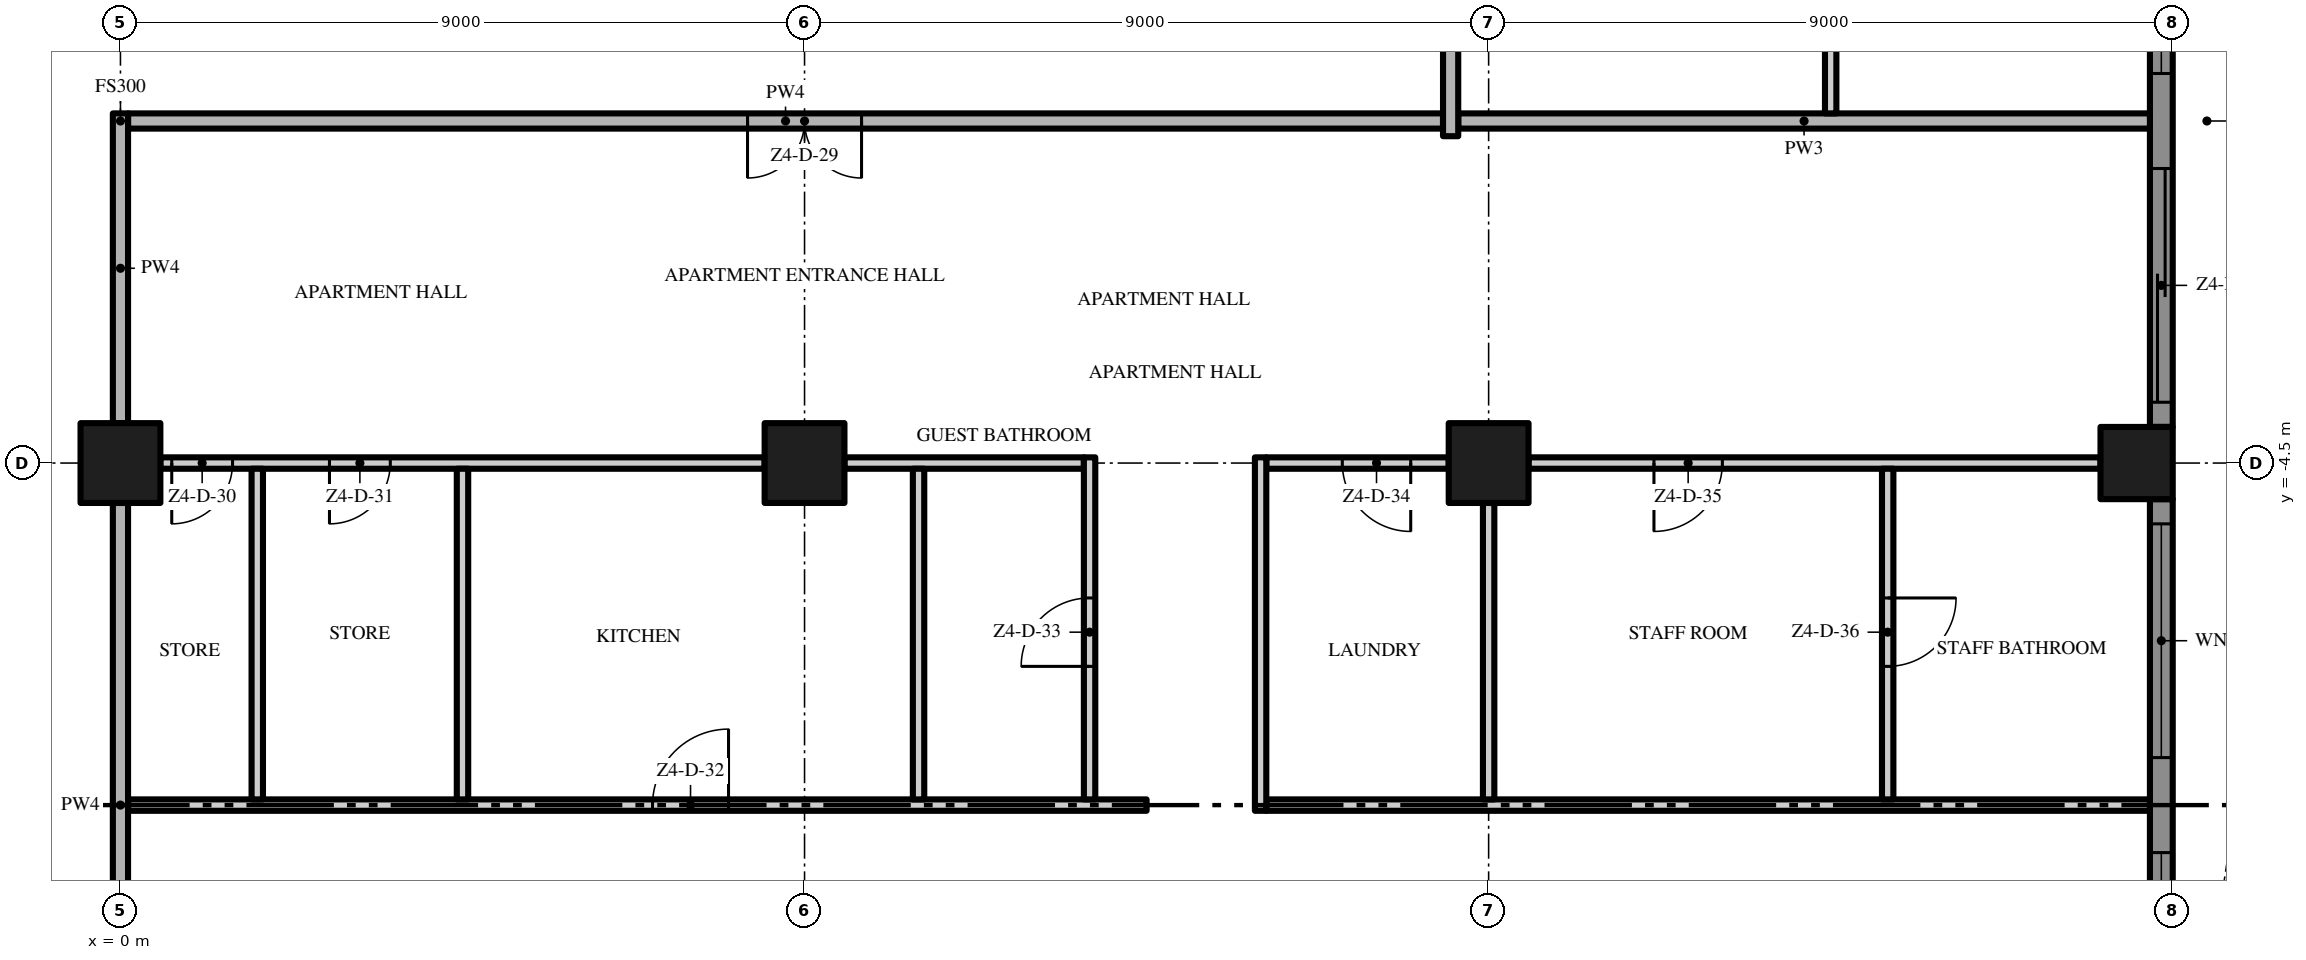
"""IFC4 building model, lengths in metres.
Left out: names, types, materials, properties, quantities, classifications, styles, units other than length and angle.
Written with IfcOpenShell. Run it as: python <this file> out.ifc"""

import sys

from ifc_helpers import new_model, si_unit, direction, frame, frame_2d, origin, origin_2d, place, context, subcontext, project, spatial, polyline, rectangle, outline, extrude, element, fill, save


model = new_model("IFC4")
c1 = context("Model", 3, precision=1e-05, world=origin(), true_north=direction((0.0, 1.0)))
c2 = subcontext(c1, "Body", "Model", "MODEL_VIEW")
j1 = project(units=[si_unit("LENGTHUNIT", "METRE"), si_unit("PLANEANGLEUNIT", "RADIAN")], contexts=[c1])
p1 = place(None, origin())
s1 = spatial("IfcSite", under=j1, at=p1, CompositionType="ELEMENT")
p2 = place(p1, origin())
s2 = spatial("IfcBuilding", under=s1, at=p2, CompositionType="ELEMENT")
p3 = place(p2, frame((0.0, 0.0, 218.6)))
s3 = spatial("IfcBuildingStorey", under=s2, at=p3, CompositionType="ELEMENT", Elevation=218.6)
for number, where, z_axis, x_axis in (
    (1, (0.0, -4.5, 0.0), (0.0, 0.0, 1.0), (1.0, 0.0, 0.0)),
    (2, (18.0, -4.5, 0.0), (0.0, 0.0, 1.0), (1.0, 0.0, 0.0)),
):
    element("IfcColumn", number, at=place(p3, frame(where, z_axis=z_axis, x_axis=x_axis)), inside=s3, PredefinedType="COLUMN", context=c2, shape_type="SweptSolid", body=[
        extrude(rectangle(XDim=1.05, YDim=1.05, at=origin_2d()), origin(), (0.0, 0.0, 1.0), 3.5),
    ])
p4 = place(p3, frame((26.525, -4.5, 0.0), z_axis=(0.0, 0.0, 1.0), x_axis=(1.0, 0.0, 0.0)))
e3 = element("IfcColumn", 3, at=p4, inside=s3, PredefinedType="COLUMN", context=c2, shape_type="SweptSolid", body=[
    extrude(rectangle(XDim=0.95, YDim=0.95, at=origin_2d()), origin(), (0.0, 0.0, 1.0), 3.5),
])
p5 = place(p3, frame((9.0, -4.5, 0.0), z_axis=(0.0, 0.0, 1.0), x_axis=(1.0, 0.0, 0.0)))
e4 = element("IfcColumn", 4, at=p5, inside=s3, PredefinedType="COLUMN", context=c2, shape_type="SweptSolid", body=[
    extrude(rectangle(XDim=1.05, YDim=1.05, at=origin_2d()), origin(), (0.0, 0.0, 1.0), 3.5),
])
p6 = place(p3, frame((26.85, -4.975, 0.0), z_axis=(0.0, 0.0, 1.0), x_axis=(0.0, -1.0, 0.0)))
e5 = element("IfcWall", 5, at=p6, inside=s3, PredefinedType="SOLIDWALL", context=c2, shape_type="SweptSolid", body=[
    extrude(rectangle(XDim=8.05, YDim=0.3, at=frame_2d((4.025, 0.0))), origin(), (0.0, 0.0, 1.0), 3.5),
])
p7 = place(p6, frame((4.65, 0.0, 0.45)))
e6 = element("IfcOpeningElement", 6, at=p7, cuts=e5, PredefinedType="OPENING", context=c2, shape_type="SweptSolid", body=[
    extrude(rectangle(XDim=3.075, YDim=2.65, at=frame_2d((1.538, 1.325))), frame((0.0, 0.16, 0.0), z_axis=(0.0, -1.0, 0.0), x_axis=(1.0, 0.0, 0.0)), (0.0, 0.0, 1.0), 0.32),
])
p8 = place(p6, frame((0.325, 0.0, 0.45)))
e7 = element("IfcOpeningElement", 7, at=p8, cuts=e5, PredefinedType="OPENING", context=c2, shape_type="SweptSolid", body=[
    extrude(rectangle(XDim=3.075, YDim=2.65, at=frame_2d((1.538, 1.325))), frame((0.0, 0.16, 0.0), z_axis=(0.0, -1.0, 0.0), x_axis=(1.0, 0.0, 0.0)), (0.0, 0.0, 1.0), 0.32),
])
p9 = place(p3, frame((26.85, 4.025, 0.0), z_axis=(0.0, 0.0, 1.0), x_axis=(0.0, -1.0, 0.0)))
e8 = element("IfcWall", 8, at=p9, inside=s3, PredefinedType="SOLIDWALL", context=c2, shape_type="SweptSolid", body=[
    extrude(rectangle(XDim=8.05, YDim=0.3, at=frame_2d((4.025, 0.0))), origin(), (0.0, 0.0, 1.0), 3.5),
])
p10 = place(p9, frame((4.65, 0.0, 0.0)))
e9 = element("IfcOpeningElement", 9, at=p10, cuts=e8, PredefinedType="OPENING", context=c2, shape_type="SweptSolid", body=[
    extrude(rectangle(XDim=3.075, YDim=2.4, at=frame_2d((1.538, 1.2))), frame((0.0, 0.16, 0.0), z_axis=(0.0, -1.0, 0.0), x_axis=(1.0, 0.0, 0.0)), (0.0, 0.0, 1.0), 0.32),
])
p11 = place(p9, frame((0.325, 0.0, 0.45)))
e10 = element("IfcOpeningElement", 10, at=p11, cuts=e8, PredefinedType="OPENING", context=c2, shape_type="SweptSolid", body=[
    extrude(rectangle(XDim=3.075, YDim=2.65, at=frame_2d((1.538, 1.325))), frame((0.0, 0.16, 0.0), z_axis=(0.0, -1.0, 0.0), x_axis=(1.0, 0.0, 0.0)), (0.0, 0.0, 1.0), 0.32),
])
p12 = place(p3, origin())
e11 = element("IfcWall", 11, at=p12, inside=s3, PredefinedType="USERDEFINED", context=c2, shape_type="SweptSolid", body=[
    extrude(outline(polyline([(30.0, -18.0), (29.771, -16.5), (29.171, -15.0), (28.429, -13.5), (27.829, -12.0), (27.6, -10.5), (27.829, -9.0), (28.429, -7.5), (29.171, -6.0), (29.771, -4.5), (30.0, -3.0), (29.771, -1.5), (29.171, 0.0), (28.429, 1.5), (27.829, 3.0), (27.6, 4.5), (27.829, 6.0), (28.429, 7.5), (29.171, 9.0), (29.771, 10.5), (30.0, 12.0), (29.771, 13.5), (29.171, 15.0), (28.429, 16.5), (27.829, 18.0), (27.597, 17.907), (28.201, 16.398), (28.942, 14.898), (29.528, 13.434), (29.747, 12.0), (29.528, 10.566), (28.942, 9.102), (28.201, 7.602), (27.586, 6.066), (27.347, 4.5), (27.586, 2.934), (28.201, 1.398), (28.942, -0.102), (29.528, -1.566), (29.747, -3.0), (29.528, -4.434), (28.942, -5.898), (28.201, -7.398), (27.586, -8.934), (27.347, -10.5), (27.586, -12.066), (28.201, -13.602), (28.942, -15.102), (29.528, -16.566), (29.753, -18.038), (30.0, -18.0)])), origin(), (0.0, 0.0, 1.0), 0.9),
])
p13 = place(p3, frame((0.1, -9.0, 0.0), z_axis=(0.0, 0.0, 1.0), x_axis=(1.0, 0.0, 0.0)))
e12 = element("IfcWall", 12, at=p13, inside=s3, PredefinedType="PARTITIONING", context=c2, shape_type="SweptSolid", body=[
    extrude(rectangle(XDim=13.4, YDim=0.15, at=frame_2d((6.7, 0.0))), origin(), (0.0, 0.0, 1.0), 3.5),
])
p14 = place(p13, frame((6.9, 0.0, 0.0)))
e13 = element("IfcOpeningElement", 13, at=p14, cuts=e12, PredefinedType="OPENING", context=c2, shape_type="SweptSolid", body=[
    extrude(rectangle(XDim=1.0, YDim=2.4, at=frame_2d((0.5, 1.2))), frame((0.0, 0.085, 0.0), z_axis=(0.0, -1.0, 0.0), x_axis=(1.0, 0.0, 0.0)), (0.0, 0.0, 1.0), 0.17),
])
p15 = place(p3, frame((15.075, -9.0, 0.0), z_axis=(0.0, 0.0, 1.0), x_axis=(1.0, 0.0, 0.0)))
e14 = element("IfcWall", 14, at=p15, inside=s3, PredefinedType="PARTITIONING", context=c2, shape_type="SweptSolid", body=[
    extrude(rectangle(XDim=11.625, YDim=0.15, at=frame_2d((5.812, 0.0))), origin(), (0.0, 0.0, 1.0), 3.5),
])
p16 = place(p3, frame((8.475, -4.5, 0.0), z_axis=(0.0, 0.0, 1.0), x_axis=(-1.0, 0.0, 0.0)))
e15 = element("IfcWall", 15, at=p16, inside=s3, PredefinedType="PARTITIONING", context=c2, shape_type="SweptSolid", body=[
    extrude(rectangle(XDim=7.95, YDim=0.15, at=frame_2d((3.975, 0.0))), origin(), (0.0, 0.0, 1.0), 3.5),
])
p17 = place(p16, frame((7.0, 0.0, 0.0)))
e16 = element("IfcOpeningElement", 16, at=p17, cuts=e15, PredefinedType="OPENING", context=c2, shape_type="SweptSolid", body=[
    extrude(rectangle(XDim=0.8, YDim=2.0, at=frame_2d((0.4, 1.0))), frame((0.0, 0.085, 0.0), z_axis=(0.0, -1.0, 0.0), x_axis=(1.0, 0.0, 0.0)), (0.0, 0.0, 1.0), 0.17),
])
p18 = place(p16, frame((4.925, 0.0, 0.0)))
e17 = element("IfcOpeningElement", 17, at=p18, cuts=e15, PredefinedType="OPENING", context=c2, shape_type="SweptSolid", body=[
    extrude(rectangle(XDim=0.8, YDim=2.0, at=frame_2d((0.4, 1.0))), frame((0.0, 0.085, 0.0), z_axis=(0.0, -1.0, 0.0), x_axis=(1.0, 0.0, 0.0)), (0.0, 0.0, 1.0), 0.17),
])
p19 = place(p3, frame((9.525, -4.5, 0.0), z_axis=(0.0, 0.0, 1.0), x_axis=(1.0, 0.0, 0.0)))
e18 = element("IfcWall", 18, at=p19, inside=s3, PredefinedType="PARTITIONING", context=c2, shape_type="SweptSolid", body=[
    extrude(rectangle(XDim=3.15, YDim=0.15, at=frame_2d((1.575, 0.0))), origin(), (0.0, 0.0, 1.0), 3.5),
])
p20 = place(p3, frame((17.475, -4.5, 0.0), z_axis=(0.0, 0.0, 1.0), x_axis=(-1.0, 0.0, 0.0)))
e19 = element("IfcWall", 19, at=p20, inside=s3, PredefinedType="PARTITIONING", context=c2, shape_type="SweptSolid", body=[
    extrude(rectangle(XDim=2.4, YDim=0.15, at=frame_2d((1.2, 0.0))), origin(), (0.0, 0.0, 1.0), 3.5),
])
p21 = place(p20, frame((0.5, 0.0, 0.0)))
e20 = element("IfcOpeningElement", 20, at=p21, cuts=e19, PredefinedType="OPENING", context=c2, shape_type="SweptSolid", body=[
    extrude(rectangle(XDim=0.9, YDim=2.1, at=frame_2d((0.45, 1.05))), frame((0.0, 0.085, 0.0), z_axis=(0.0, -1.0, 0.0), x_axis=(1.0, 0.0, 0.0)), (0.0, 0.0, 1.0), 0.17),
])
p22 = place(p3, frame((26.05, -4.5, 0.0), z_axis=(0.0, 0.0, 1.0), x_axis=(-1.0, 0.0, 0.0)))
e21 = element("IfcWall", 21, at=p22, inside=s3, PredefinedType="PARTITIONING", context=c2, shape_type="SweptSolid", body=[
    extrude(rectangle(XDim=7.525, YDim=0.15, at=frame_2d((3.763, 0.0))), origin(), (0.0, 0.0, 1.0), 3.5),
])
p23 = place(p22, frame((4.975, 0.0, 0.0)))
e22 = element("IfcOpeningElement", 22, at=p23, cuts=e21, PredefinedType="OPENING", context=c2, shape_type="SweptSolid", body=[
    extrude(rectangle(XDim=0.9, YDim=2.1, at=frame_2d((0.45, 1.05))), frame((0.0, 0.085, 0.0), z_axis=(0.0, -1.0, 0.0), x_axis=(1.0, 0.0, 0.0)), (0.0, 0.0, 1.0), 0.17),
])
p24 = place(p3, frame((17.4, 0.0, 0.0), z_axis=(0.0, 0.0, 1.0), x_axis=(-1.0, 0.0, 0.0)))
e23 = element("IfcWall", 23, at=p24, inside=s3, PredefinedType="PARTITIONING", context=c2, shape_type="SweptSolid", body=[
    extrude(rectangle(XDim=17.3, YDim=0.2, at=frame_2d((8.65, 0.0))), origin(), (0.0, 0.0, 1.0), 3.5),
])
p25 = place(p24, frame((7.65, 0.0, 0.0)))
e24 = element("IfcOpeningElement", 24, at=p25, cuts=e23, PredefinedType="OPENING", context=c2, shape_type="SweptSolid", body=[
    extrude(rectangle(XDim=1.5, YDim=2.4, at=frame_2d((0.75, 1.2))), frame((0.0, 0.11, 0.0), z_axis=(0.0, -1.0, 0.0), x_axis=(1.0, 0.0, 0.0)), (0.0, 0.0, 1.0), 0.22),
])
p26 = place(p3, frame((17.6, 0.0, 0.0), z_axis=(0.0, 0.0, 1.0), x_axis=(1.0, 0.0, 0.0)))
e25 = element("IfcWall", 25, at=p26, inside=s3, PredefinedType="PARTITIONING", context=c2, shape_type="SweptSolid", body=[
    extrude(rectangle(XDim=9.1, YDim=0.2, at=frame_2d((4.55, 0.0))), origin(), (0.0, 0.0, 1.0), 3.5),
])
p27 = place(p3, frame((0.0, -12.975, 0.0), z_axis=(0.0, 0.0, 1.0), x_axis=(0.0, 1.0, 0.0)))
e26 = element("IfcWall", 26, at=p27, inside=s3, PredefinedType="PARTITIONING", context=c2, shape_type="SweptSolid", body=[
    extrude(rectangle(XDim=7.95, YDim=0.2, at=frame_2d((3.975, 0.0))), origin(), (0.0, 0.0, 1.0), 3.5),
])
p28 = place(p3, frame((0.0, -3.975, 0.0), z_axis=(0.0, 0.0, 1.0), x_axis=(0.0, 1.0, 0.0)))
e27 = element("IfcWall", 27, at=p28, inside=s3, PredefinedType="PARTITIONING", context=c2, shape_type="SweptSolid", body=[
    extrude(rectangle(XDim=4.075, YDim=0.2, at=frame_2d((2.038, 0.0))), origin(), (0.0, 0.0, 1.0), 3.5),
])
for number, where, z_axis, x_axis in (
    (28, (1.8, -8.925, 0.0), (0.0, 0.0, 1.0), (0.0, 1.0, 0.0)),
    (29, (4.5, -8.925, 0.0), (0.0, 0.0, 1.0), (0.0, 1.0, 0.0)),
    (30, (10.5, -8.925, 0.0), (0.0, 0.0, 1.0), (0.0, 1.0, 0.0)),
):
    element("IfcWall", number, at=place(p3, frame(where, z_axis=z_axis, x_axis=x_axis)), inside=s3, PredefinedType="PARTITIONING", context=c2, shape_type="SweptSolid", body=[
        extrude(rectangle(XDim=4.35, YDim=0.15, at=frame_2d((2.175, 0.0))), origin(), (0.0, 0.0, 1.0), 3.5),
    ])
p29 = place(p3, frame((12.75, -8.925, 0.0), z_axis=(0.0, 0.0, 1.0), x_axis=(0.0, 1.0, 0.0)))
e31 = element("IfcWall", 31, at=p29, inside=s3, PredefinedType="PARTITIONING", context=c2, shape_type="SweptSolid", body=[
    extrude(rectangle(XDim=4.5, YDim=0.15, at=frame_2d((2.25, 0.0))), origin(), (0.0, 0.0, 1.0), 3.5),
])
p30 = place(p29, frame((1.75, 0.0, 0.0)))
e32 = element("IfcOpeningElement", 32, at=p30, cuts=e31, PredefinedType="OPENING", context=c2, shape_type="SweptSolid", body=[
    extrude(rectangle(XDim=0.9, YDim=2.1, at=frame_2d((0.45, 1.05))), frame((0.0, 0.085, 0.0), z_axis=(0.0, -1.0, 0.0), x_axis=(1.0, 0.0, 0.0)), (0.0, 0.0, 1.0), 0.17),
])
p31 = place(p3, frame((15.0, -9.075, 0.0), z_axis=(0.0, 0.0, 1.0), x_axis=(0.0, 1.0, 0.0)))
e33 = element("IfcWall", 33, at=p31, inside=s3, PredefinedType="PARTITIONING", context=c2, shape_type="SweptSolid", body=[
    extrude(rectangle(XDim=4.65, YDim=0.15, at=frame_2d((2.325, 0.0))), origin(), (0.0, 0.0, 1.0), 3.5),
])
p32 = place(p3, frame((17.5, -0.2, 0.0), z_axis=(0.0, 0.0, 1.0), x_axis=(0.0, 1.0, 0.0)))
e34 = element("IfcWall", 34, at=p32, inside=s3, PredefinedType="PARTITIONING", context=c2, shape_type="SweptSolid", body=[
    extrude(rectangle(XDim=4.175, YDim=0.2, at=frame_2d((2.087, 0.0))), origin(), (0.0, 0.0, 1.0), 3.5),
])
p33 = place(p3, frame((18.0, -8.925, 0.0), z_axis=(0.0, 0.0, 1.0), x_axis=(0.0, 1.0, 0.0)))
e35 = element("IfcWall", 35, at=p33, inside=s3, PredefinedType="PARTITIONING", context=c2, shape_type="SweptSolid", body=[
    extrude(rectangle(XDim=3.9, YDim=0.15, at=frame_2d((1.95, 0.0))), origin(), (0.0, 0.0, 1.0), 3.5),
])
p34 = place(p3, frame((22.5, 17.525, 0.0), z_axis=(0.0, 0.0, 1.0), x_axis=(0.0, -1.0, 0.0)))
e36 = element("IfcWall", 36, at=p34, inside=s3, PredefinedType="PARTITIONING", context=c2, shape_type="SweptSolid", body=[
    extrude(rectangle(XDim=17.425, YDim=0.15, at=frame_2d((8.713, 0.0))), origin(), (0.0, 0.0, 1.0), 3.5),
])
p35 = place(p34, frame((14.775, 0.0, 0.0)))
e37 = element("IfcOpeningElement", 37, at=p35, cuts=e36, PredefinedType="OPENING", context=c2, shape_type="SweptSolid", body=[
    extrude(rectangle(XDim=1.0, YDim=2.4, at=frame_2d((0.5, 1.2))), frame((0.0, 0.085, 0.0), z_axis=(0.0, -1.0, 0.0), x_axis=(1.0, 0.0, 0.0)), (0.0, 0.0, 1.0), 0.17),
])
p36 = place(p34, frame((11.425, 0.0, 0.0)))
e38 = element("IfcOpeningElement", 38, at=p36, cuts=e36, PredefinedType="OPENING", context=c2, shape_type="SweptSolid", body=[
    extrude(rectangle(XDim=1.0, YDim=2.4, at=frame_2d((0.5, 1.2))), frame((0.0, 0.085, 0.0), z_axis=(0.0, -1.0, 0.0), x_axis=(1.0, 0.0, 0.0)), (0.0, 0.0, 1.0), 0.17),
])
p37 = place(p34, frame((2.375, 0.0, 0.0)))
e39 = element("IfcOpeningElement", 39, at=p37, cuts=e36, PredefinedType="OPENING", context=c2, shape_type="SweptSolid", body=[
    extrude(rectangle(XDim=1.8, YDim=2.4, at=frame_2d((0.9, 1.2))), frame((0.0, 0.085, 0.0), z_axis=(0.0, -1.0, 0.0), x_axis=(1.0, 0.0, 0.0)), (0.0, 0.0, 1.0), 0.17),
])
p38 = place(p3, frame((23.25, -4.575, 0.0), z_axis=(0.0, 0.0, 1.0), x_axis=(0.0, -1.0, 0.0)))
e40 = element("IfcWall", 40, at=p38, inside=s3, PredefinedType="PARTITIONING", context=c2, shape_type="SweptSolid", body=[
    extrude(rectangle(XDim=4.35, YDim=0.15, at=frame_2d((2.175, 0.0))), origin(), (0.0, 0.0, 1.0), 3.5),
])
p39 = place(p38, frame((1.7, 0.0, 0.0)))
e41 = element("IfcOpeningElement", 41, at=p39, cuts=e40, PredefinedType="OPENING", context=c2, shape_type="SweptSolid", body=[
    extrude(rectangle(XDim=0.9, YDim=2.1, at=frame_2d((0.45, 1.05))), frame((0.0, 0.085, 0.0), z_axis=(0.0, -1.0, 0.0), x_axis=(1.0, 0.0, 0.0)), (0.0, 0.0, 1.0), 0.17),
])
p40 = place(p7, origin())
e42 = element("IfcWindow", 42, at=p40, inside=s3, PartitioningType="SINGLE_PANEL", PredefinedType="WINDOW", context=c2, shape_type="SweptSolid", body=[
    extrude(rectangle(XDim=3.075, YDim=2.65, at=frame_2d((1.538, 1.325))), frame((0.0, 0.03, 0.0), z_axis=(0.0, -1.0, 0.0), x_axis=(1.0, 0.0, 0.0)), (0.0, 0.0, 1.0), 0.06),
])
fill(e6, e42)
p41 = place(p8, origin())
e43 = element("IfcWindow", 43, at=p41, inside=s3, PartitioningType="SINGLE_PANEL", PredefinedType="WINDOW", context=c2, shape_type="SweptSolid", body=[
    extrude(rectangle(XDim=3.075, YDim=2.65, at=frame_2d((1.538, 1.325))), frame((0.0, 0.03, 0.0), z_axis=(0.0, -1.0, 0.0), x_axis=(1.0, 0.0, 0.0)), (0.0, 0.0, 1.0), 0.06),
])
fill(e7, e43)
p42 = place(p10, origin())
e44 = element("IfcDoor", 44, at=p42, inside=s3, OperationType="SINGLE_SWING_LEFT", PredefinedType="DOOR", context=c2, shape_type="SweptSolid", body=[
    extrude(rectangle(XDim=3.075, YDim=2.4, at=frame_2d((1.538, 1.2))), frame((0.0, 0.025, 0.0), z_axis=(0.0, -1.0, 0.0), x_axis=(1.0, 0.0, 0.0)), (0.0, 0.0, 1.0), 0.05),
])
fill(e9, e44)
p43 = place(p11, origin())
e45 = element("IfcWindow", 45, at=p43, inside=s3, PartitioningType="SINGLE_PANEL", PredefinedType="WINDOW", context=c2, shape_type="SweptSolid", body=[
    extrude(rectangle(XDim=3.075, YDim=2.65, at=frame_2d((1.538, 1.325))), frame((0.0, 0.03, 0.0), z_axis=(0.0, -1.0, 0.0), x_axis=(1.0, 0.0, 0.0)), (0.0, 0.0, 1.0), 0.06),
])
fill(e10, e45)
p44 = place(p25, origin())
e46 = element("IfcDoor", 46, at=p44, inside=s3, OperationType="DOUBLE_DOOR_SINGLE_SWING", PredefinedType="DOOR", context=c2, shape_type="SweptSolid", body=[
    extrude(rectangle(XDim=1.5, YDim=2.4, at=frame_2d((0.75, 1.2))), frame((0.0, 0.025, 0.0), z_axis=(0.0, -1.0, 0.0), x_axis=(1.0, 0.0, 0.0)), (0.0, 0.0, 1.0), 0.05),
])
fill(e24, e46)
p45 = place(p17, origin())
e47 = element("IfcDoor", 47, at=p45, inside=s3, OperationType="SINGLE_SWING_RIGHT", PredefinedType="DOOR", context=c2, shape_type="SweptSolid", body=[
    extrude(rectangle(XDim=0.8, YDim=2.0, at=frame_2d((0.4, 1.0))), frame((0.0, 0.025, 0.0), z_axis=(0.0, -1.0, 0.0), x_axis=(1.0, 0.0, 0.0)), (0.0, 0.0, 1.0), 0.05),
])
fill(e16, e47)
p46 = place(p18, origin())
e48 = element("IfcDoor", 48, at=p46, inside=s3, OperationType="SINGLE_SWING_RIGHT", PredefinedType="DOOR", context=c2, shape_type="SweptSolid", body=[
    extrude(rectangle(XDim=0.8, YDim=2.0, at=frame_2d((0.4, 1.0))), frame((0.0, 0.025, 0.0), z_axis=(0.0, -1.0, 0.0), x_axis=(1.0, 0.0, 0.0)), (0.0, 0.0, 1.0), 0.05),
])
fill(e17, e48)
p47 = place(p14, origin())
e49 = element("IfcDoor", 49, at=p47, inside=s3, OperationType="SINGLE_SWING_RIGHT", PredefinedType="DOOR", context=c2, shape_type="SweptSolid", body=[
    extrude(rectangle(XDim=1.0, YDim=2.4, at=frame_2d((0.5, 1.2))), frame((0.0, 0.025, 0.0), z_axis=(0.0, -1.0, 0.0), x_axis=(1.0, 0.0, 0.0)), (0.0, 0.0, 1.0), 0.05),
])
fill(e13, e49)
p48 = place(p30, origin())
e50 = element("IfcDoor", 50, at=p48, inside=s3, OperationType="SINGLE_SWING_LEFT", PredefinedType="DOOR", context=c2, shape_type="SweptSolid", body=[
    extrude(rectangle(XDim=0.9, YDim=2.1, at=frame_2d((0.45, 1.05))), frame((0.0, 0.025, 0.0), z_axis=(0.0, -1.0, 0.0), x_axis=(1.0, 0.0, 0.0)), (0.0, 0.0, 1.0), 0.05),
])
fill(e32, e50)
p49 = place(p21, origin())
e51 = element("IfcDoor", 51, at=p49, inside=s3, OperationType="SINGLE_SWING_LEFT", PredefinedType="DOOR", context=c2, shape_type="SweptSolid", body=[
    extrude(rectangle(XDim=0.9, YDim=2.1, at=frame_2d((0.45, 1.05))), frame((0.0, 0.025, 0.0), z_axis=(0.0, -1.0, 0.0), x_axis=(1.0, 0.0, 0.0)), (0.0, 0.0, 1.0), 0.05),
])
fill(e20, e51)
p50 = place(p23, origin())
e52 = element("IfcDoor", 52, at=p50, inside=s3, OperationType="SINGLE_SWING_RIGHT", PredefinedType="DOOR", context=c2, shape_type="SweptSolid", body=[
    extrude(rectangle(XDim=0.9, YDim=2.1, at=frame_2d((0.45, 1.05))), frame((0.0, 0.025, 0.0), z_axis=(0.0, -1.0, 0.0), x_axis=(1.0, 0.0, 0.0)), (0.0, 0.0, 1.0), 0.05),
])
fill(e22, e52)
p51 = place(p39, origin())
e53 = element("IfcDoor", 53, at=p51, inside=s3, OperationType="SINGLE_SWING_LEFT", PredefinedType="DOOR", context=c2, shape_type="SweptSolid", body=[
    extrude(rectangle(XDim=0.9, YDim=2.1, at=frame_2d((0.45, 1.05))), frame((0.0, 0.025, 0.0), z_axis=(0.0, -1.0, 0.0), x_axis=(1.0, 0.0, 0.0)), (0.0, 0.0, 1.0), 0.05),
])
fill(e41, e53)
save(model, sys.argv[1])
